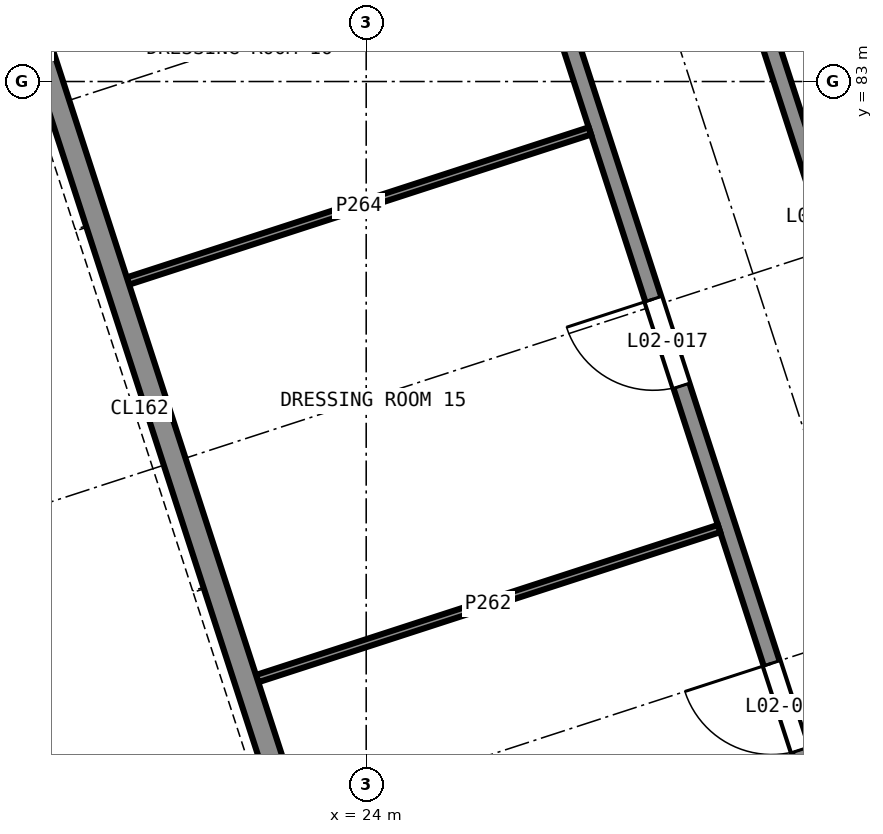
"""IFC4 building model, lengths in metres.
Left out: names, types, materials, properties, quantities, classifications, styles, units other than length and angle.
Written with IfcOpenShell. Run it as: python <this file> out.ifc"""

import sys

from ifc_helpers import new_model, si_unit, direction, frame, frame_2d, origin, place, context, subcontext, project, spatial, rectangle, extrude, element, fill, save


model = new_model("IFC4")
c1 = context("Model", 3, precision=1e-05, world=origin(), true_north=direction((0.0, 1.0)))
c2 = subcontext(c1, "Body", "Model", "MODEL_VIEW")
j1 = project(units=[si_unit("LENGTHUNIT", "METRE"), si_unit("PLANEANGLEUNIT", "RADIAN")], contexts=[c1])
p1 = place(None, origin())
s1 = spatial("IfcSite", under=j1, at=p1, CompositionType="ELEMENT")
p2 = place(p1, origin())
s2 = spatial("IfcBuilding", under=s1, at=p2, CompositionType="ELEMENT")
p3 = place(p2, frame((0.0, 0.0, 9.5)))
s3 = spatial("IfcBuildingStorey", under=s2, at=p3, CompositionType="ELEMENT", Elevation=9.5)
p4 = place(p3, frame((33.501, 41.003, 0.0), z_axis=(0.0, 0.0, 1.0), x_axis=(-0.309017194826, 0.951056451165, 0.0)))
e1 = element("IfcWall", 1, at=p4, inside=s3, PredefinedType="SOLIDWALL", context=c2, shape_type="SweptSolid", body=[
    extrude(rectangle(XDim=53.7, YDim=0.3, at=frame_2d((26.85, 0.0))), origin(), (0.0, 0.0, 1.0), 4.0),
])
p5 = place(p4, frame((21.55, 0.0, 0.9)))
e2 = element("IfcOpeningElement", 2, at=p5, cuts=e1, PredefinedType="OPENING", context=c2, shape_type="SweptSolid", body=[
    extrude(rectangle(XDim=3.6, YDim=2.1, at=frame_2d((1.8, 1.05))), frame((0.0, 0.16, 0.0), z_axis=(0.0, -1.0, 0.0), x_axis=(1.0, 0.0, 0.0)), (0.0, 0.0, 1.0), 0.32),
])
p6 = place(p3, frame((37.956, 48.812, 0.0), z_axis=(0.0, 0.0, 1.0), x_axis=(-0.30901736393, 0.951056396219, 0.0)))
e3 = element("IfcWall", 3, at=p6, inside=s3, PredefinedType="SOLIDWALL", context=c2, shape_type="SweptSolid", body=[
    extrude(rectangle(XDim=41.7, YDim=0.22, at=frame_2d((20.85, 0.0))), origin(), (0.0, 0.0, 1.0), 3.7),
])
p7 = place(p6, frame((2.009, 0.0, 0.0)))
e4 = element("IfcOpeningElement", 4, at=p7, cuts=e3, PredefinedType="OPENING", context=c2, shape_type="SweptSolid", body=[
    extrude(rectangle(XDim=1.0, YDim=2.1, at=frame_2d((0.5, 1.05))), frame((0.0, 0.12, 0.0), z_axis=(0.0, -1.0, 0.0), x_axis=(1.0, 0.0, 0.0)), (0.0, 0.0, 1.0), 0.24),
])
p8 = place(p6, frame((6.6, 0.0, 0.0)))
e5 = element("IfcOpeningElement", 5, at=p8, cuts=e3, PredefinedType="OPENING", context=c2, shape_type="SweptSolid", body=[
    extrude(rectangle(XDim=1.2, YDim=2.1, at=frame_2d((0.6, 1.05))), frame((0.0, 0.12, 0.0), z_axis=(0.0, -1.0, 0.0), x_axis=(1.0, 0.0, 0.0)), (0.0, 0.0, 1.0), 0.24),
])
p9 = place(p6, frame((11.7, 0.0, 0.0)))
e6 = element("IfcOpeningElement", 6, at=p9, cuts=e3, PredefinedType="OPENING", context=c2, shape_type="SweptSolid", body=[
    extrude(rectangle(XDim=1.2, YDim=2.1, at=frame_2d((0.6, 1.05))), frame((0.0, 0.12, 0.0), z_axis=(0.0, -1.0, 0.0), x_axis=(1.0, 0.0, 0.0)), (0.0, 0.0, 1.0), 0.24),
])
p10 = place(p6, frame((16.7, 0.0, 0.0)))
e7 = element("IfcOpeningElement", 7, at=p10, cuts=e3, PredefinedType="OPENING", context=c2, shape_type="SweptSolid", body=[
    extrude(rectangle(XDim=1.2, YDim=2.1, at=frame_2d((0.6, 1.05))), frame((0.0, 0.12, 0.0), z_axis=(0.0, -1.0, 0.0), x_axis=(1.0, 0.0, 0.0)), (0.0, 0.0, 1.0), 0.24),
])
p11 = place(p6, frame((21.7, 0.0, 0.0)))
e8 = element("IfcOpeningElement", 8, at=p11, cuts=e3, PredefinedType="OPENING", context=c2, shape_type="SweptSolid", body=[
    extrude(rectangle(XDim=1.2, YDim=2.1, at=frame_2d((0.6, 1.05))), frame((0.0, 0.12, 0.0), z_axis=(0.0, -1.0, 0.0), x_axis=(1.0, 0.0, 0.0)), (0.0, 0.0, 1.0), 0.24),
])
p12 = place(p6, frame((26.7, 0.0, 0.0)))
e9 = element("IfcOpeningElement", 9, at=p12, cuts=e3, PredefinedType="OPENING", context=c2, shape_type="SweptSolid", body=[
    extrude(rectangle(XDim=1.2, YDim=2.1, at=frame_2d((0.6, 1.05))), frame((0.0, 0.12, 0.0), z_axis=(0.0, -1.0, 0.0), x_axis=(1.0, 0.0, 0.0)), (0.0, 0.0, 1.0), 0.24),
])
p13 = place(p6, frame((31.739, 0.0, 0.0)))
e10 = element("IfcOpeningElement", 10, at=p13, cuts=e3, PredefinedType="OPENING", context=c2, shape_type="SweptSolid", body=[
    extrude(rectangle(XDim=1.2, YDim=2.1, at=frame_2d((0.6, 1.05))), frame((0.0, 0.12, 0.0), z_axis=(0.0, -1.0, 0.0), x_axis=(1.0, 0.0, 0.0)), (0.0, 0.0, 1.0), 0.24),
])
p14 = place(p3, frame((40.333, 49.584, 0.0), z_axis=(0.0, 0.0, 1.0), x_axis=(-0.309015643281, 0.951056955291, 0.0)))
e11 = element("IfcWall", 11, at=p14, inside=s3, PredefinedType="SOLIDWALL", context=c2, shape_type="SweptSolid", body=[
    extrude(rectangle(XDim=41.7, YDim=0.22, at=frame_2d((20.85, 0.0))), origin(), (0.0, 0.0, 1.0), 3.7),
])
p15 = place(p14, frame((1.9, 0.0, 0.0)))
e12 = element("IfcOpeningElement", 12, at=p15, cuts=e11, PredefinedType="OPENING", context=c2, shape_type="SweptSolid", body=[
    extrude(rectangle(XDim=1.2, YDim=2.1, at=frame_2d((0.6, 1.05))), frame((0.0, 0.12, 0.0), z_axis=(0.0, -1.0, 0.0), x_axis=(1.0, 0.0, 0.0)), (0.0, 0.0, 1.0), 0.24),
])
p16 = place(p14, frame((8.285, 0.0, 0.0)))
e13 = element("IfcOpeningElement", 13, at=p16, cuts=e11, PredefinedType="OPENING", context=c2, shape_type="SweptSolid", body=[
    extrude(rectangle(XDim=1.0, YDim=2.1, at=frame_2d((0.5, 1.05))), frame((0.0, 0.12, 0.0), z_axis=(0.0, -1.0, 0.0), x_axis=(1.0, 0.0, 0.0)), (0.0, 0.0, 1.0), 0.24),
])
p17 = place(p14, frame((16.475, 0.0, 0.0)))
e14 = element("IfcOpeningElement", 14, at=p17, cuts=e11, PredefinedType="OPENING", context=c2, shape_type="SweptSolid", body=[
    extrude(rectangle(XDim=1.0, YDim=2.1, at=frame_2d((0.5, 1.05))), frame((0.0, 0.12, 0.0), z_axis=(0.0, -1.0, 0.0), x_axis=(1.0, 0.0, 0.0)), (0.0, 0.0, 1.0), 0.24),
])
p18 = place(p14, frame((25.752, 0.0, 0.0)))
e15 = element("IfcOpeningElement", 15, at=p18, cuts=e11, PredefinedType="OPENING", context=c2, shape_type="SweptSolid", body=[
    extrude(rectangle(XDim=1.0, YDim=2.1, at=frame_2d((0.5, 1.05))), frame((0.0, 0.12, 0.0), z_axis=(0.0, -1.0, 0.0), x_axis=(1.0, 0.0, 0.0)), (0.0, 0.0, 1.0), 0.24),
])
p19 = place(p14, frame((32.761, 0.0, 0.0)))
e16 = element("IfcOpeningElement", 16, at=p19, cuts=e11, PredefinedType="OPENING", context=c2, shape_type="SweptSolid", body=[
    extrude(rectangle(XDim=1.0, YDim=2.1, at=frame_2d((0.5, 1.05))), frame((0.0, 0.12, 0.0), z_axis=(0.0, -1.0, 0.0), x_axis=(1.0, 0.0, 0.0)), (0.0, 0.0, 1.0), 0.24),
])
for number, where, z_axis, x_axis in (
    (17, (22.565, 75.144, 0.0), (0.0, 0.0, 1.0), (0.951, 0.309, 0.0)),
    (18, (20.865, 80.375, 0.0), (0.0, 0.0, 1.0), (0.951, 0.309, 0.0)),
):
    element("IfcWall", number, at=place(p3, frame(where, z_axis=z_axis, x_axis=x_axis)), inside=s3, PredefinedType="PARTITIONING", context=c2, shape_type="SweptSolid", body=[
        extrude(rectangle(XDim=6.39, YDim=0.1, at=frame_2d((3.195, 0.0))), origin(), (0.0, 0.0, 1.0), 3.7),
    ])
p20 = place(p12, origin())
e19 = element("IfcDoor", 19, at=p20, inside=s3, OperationType="SINGLE_SWING_LEFT", PredefinedType="DOOR", context=c2, shape_type="SweptSolid", body=[
    extrude(rectangle(XDim=1.2, YDim=2.1, at=frame_2d((0.6, 1.05))), frame((0.0, 0.025, 0.0), z_axis=(0.0, -1.0, 0.0), x_axis=(1.0, 0.0, 0.0)), (0.0, 0.0, 1.0), 0.05),
])
fill(e9, e19)
p21 = place(p13, origin())
e20 = element("IfcDoor", 20, at=p21, inside=s3, OperationType="SINGLE_SWING_LEFT", PredefinedType="DOOR", context=c2, shape_type="SweptSolid", body=[
    extrude(rectangle(XDim=1.2, YDim=2.1, at=frame_2d((0.6, 1.05))), frame((0.0, 0.025, 0.0), z_axis=(0.0, -1.0, 0.0), x_axis=(1.0, 0.0, 0.0)), (0.0, 0.0, 1.0), 0.05),
])
fill(e10, e20)
save(model, sys.argv[1])
